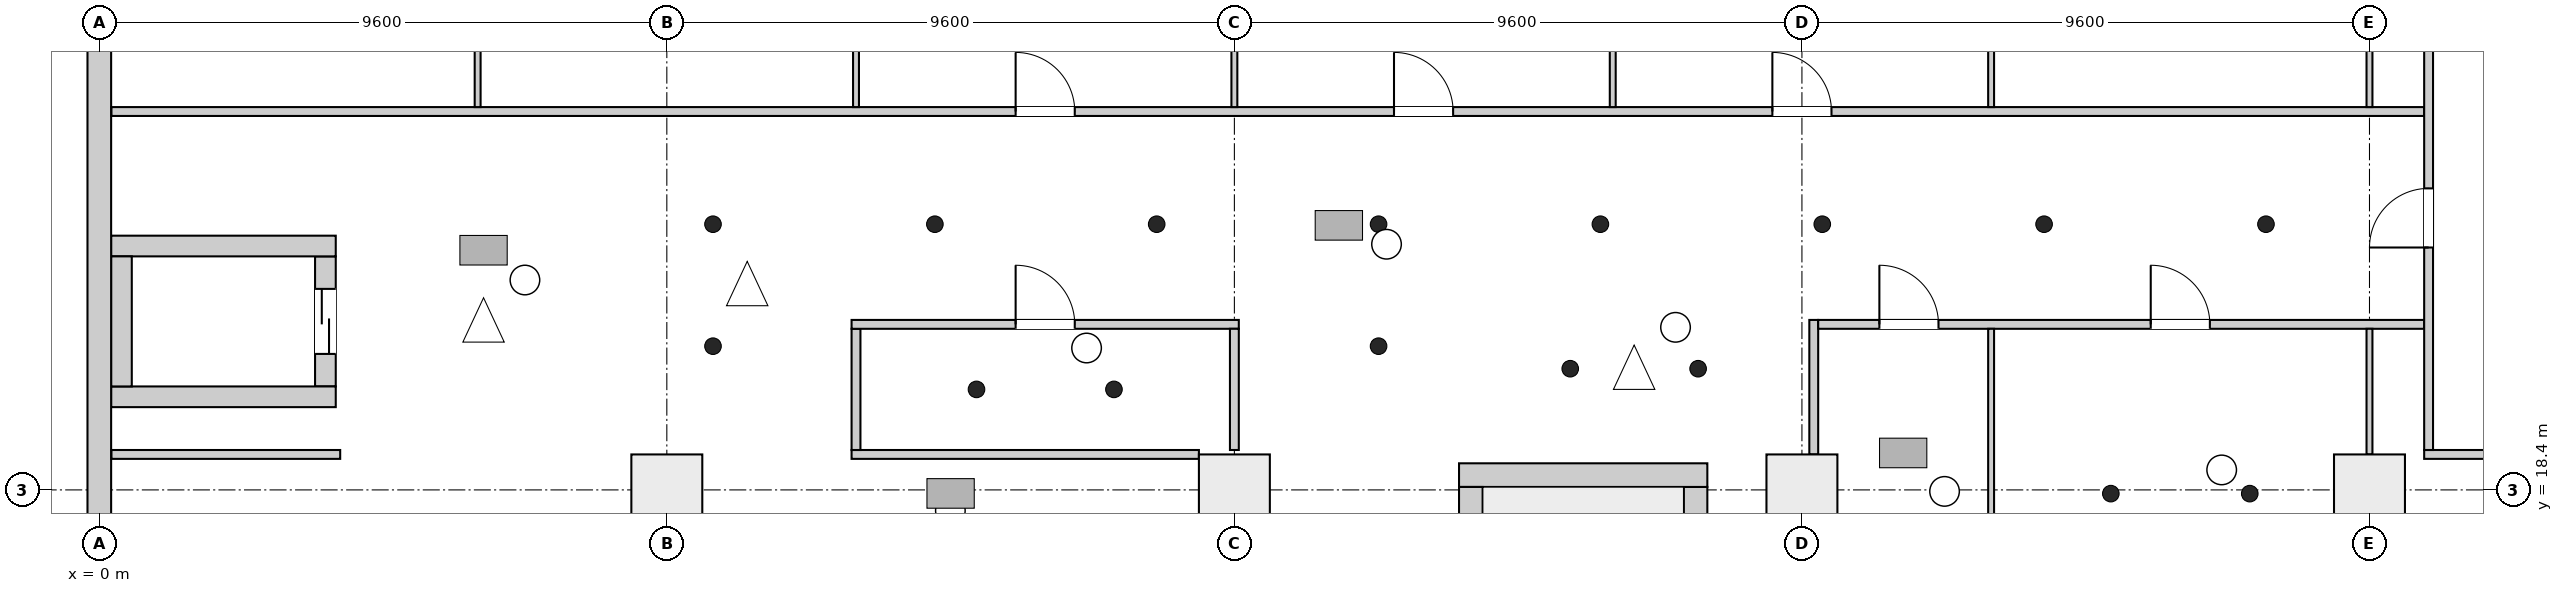
"""IFC4 building model, lengths in metres.
Left out: names, types, materials, properties, quantities, classifications, styles, units other than length and angle.
Written with IfcOpenShell. Run it as: python <this file> out.ifc"""

import sys

from ifc_helpers import new_model, si_unit, direction, frame, frame_2d, origin, origin_2d, place, context, subcontext, project, spatial, rectangle, extrude, element, fill, save


model = new_model("IFC4")
c1 = context("Model", 3, precision=1e-05, world=origin(), true_north=direction((0.0, 1.0)))
c2 = subcontext(c1, "Body", "Model", "MODEL_VIEW")
j1 = project(units=[si_unit("LENGTHUNIT", "METRE"), si_unit("PLANEANGLEUNIT", "RADIAN")], contexts=[c1])
p1 = place(None, origin())
s1 = spatial("IfcSite", under=j1, at=p1, CompositionType="ELEMENT")
p2 = place(p1, origin())
s2 = spatial("IfcBuilding", under=s1, at=p2, CompositionType="ELEMENT")
p3 = place(p2, frame((0.0, 0.0, 21.7)))
s3 = spatial("IfcBuildingStorey", under=s2, at=p3, CompositionType="ELEMENT", Elevation=21.7)
p4 = place(p3, frame((0.0, -0.2, 0.0), z_axis=(0.0, 0.0, 1.0), x_axis=(0.0, 1.0, 0.0)))
e1 = element("IfcWall", 1, at=p4, inside=s3, PredefinedType="SHEAR", context=c2, shape_type="SweptSolid", body=[
    extrude(rectangle(XDim=46.88, YDim=0.4, at=frame_2d((23.44, 0.0))), origin(), (0.0, 0.0, 1.0), 5.0),
])
p5 = place(p3, frame((23.0, 18.65, 0.0), z_axis=(0.0, 0.0, 1.0), x_axis=(1.0, 0.0, 0.0)))
e2 = element("IfcWall", 2, at=p5, inside=s3, PredefinedType="SHEAR", context=c2, shape_type="SweptSolid", body=[
    extrude(rectangle(XDim=4.2, YDim=0.4, at=frame_2d((2.1, 0.0))), origin(), (0.0, 0.0, 1.0), 5.0),
])
for number, where, z_axis, x_axis in (
    (3, (23.2, 11.85, 0.0), (0.0, 0.0, 1.0), (0.0, 1.0, 0.0)),
    (4, (27.0, 11.85, 0.0), (0.0, 0.0, 1.0), (0.0, 1.0, 0.0)),
):
    element("IfcWall", number, at=place(p3, frame(where, z_axis=z_axis, x_axis=x_axis)), inside=s3, PredefinedType="SHEAR", context=c2, shape_type="SweptSolid", body=[
        extrude(rectangle(XDim=6.6, YDim=0.4, at=frame_2d((3.3, 0.0))), origin(), (0.0, 0.0, 1.0), 5.0),
    ])
for number, where, z_axis, x_axis in (
    (5, (0.2, 19.975, 0.0), (0.0, 0.0, 1.0), (1.0, 0.0, 0.0)),
    (6, (0.2, 22.525, 0.0), (0.0, 0.0, 1.0), (1.0, 0.0, 0.0)),
):
    element("IfcWall", number, at=place(p3, frame(where, z_axis=z_axis, x_axis=x_axis)), inside=s3, PredefinedType="SHEAR", context=c2, shape_type="SweptSolid", body=[
        extrude(rectangle(XDim=3.8, YDim=0.35, at=frame_2d((1.9, 0.0))), origin(), (0.0, 0.0, 1.0), 5.0),
    ])
p6 = place(p3, frame((0.375, 20.15, 0.0), z_axis=(0.0, 0.0, 1.0), x_axis=(0.0, 1.0, 0.0)))
e7 = element("IfcWall", 7, at=p6, inside=s3, PredefinedType="SHEAR", context=c2, shape_type="SweptSolid", body=[
    extrude(rectangle(XDim=2.2, YDim=0.35, at=frame_2d((1.1, 0.0))), origin(), (0.0, 0.0, 1.0), 5.0),
])
p7 = place(p3, frame((3.825, 20.15, 0.0), z_axis=(0.0, 0.0, 1.0), x_axis=(0.0, 1.0, 0.0)))
e8 = element("IfcWall", 8, at=p7, inside=s3, PredefinedType="SHEAR", context=c2, shape_type="SweptSolid", body=[
    extrude(rectangle(XDim=2.2, YDim=0.35, at=frame_2d((1.1, 0.0))), origin(), (0.0, 0.0, 1.0), 5.0),
])
p8 = place(p7, frame((0.55, 0.0, 0.0)))
e9 = element("IfcOpeningElement", 9, at=p8, cuts=e8, PredefinedType="OPENING", context=c2, shape_type="SweptSolid", body=[
    extrude(rectangle(XDim=1.1, YDim=2.1, at=frame_2d((0.55, 1.05))), frame((0.0, 0.185, 0.0), z_axis=(0.0, -1.0, 0.0), x_axis=(1.0, 0.0, 0.0)), (0.0, 0.0, 1.0), 0.37),
])
for number, where, z_axis, x_axis in (
    (10, (9.6, 18.4, 0.0), (0.0, 0.0, 1.0), (1.0, 0.0, 0.0)),
    (11, (19.2, 18.4, 0.0), (0.0, 0.0, 1.0), (1.0, 0.0, 0.0)),
    (12, (28.8, 18.4, 0.0), (0.0, 0.0, 1.0), (1.0, 0.0, 0.0)),
    (13, (38.4, 18.4, 0.0), (0.0, 0.0, 1.0), (1.0, 0.0, 0.0)),
):
    element("IfcColumn", number, at=place(p3, frame(where, z_axis=z_axis, x_axis=x_axis)), inside=s3, PredefinedType="COLUMN", context=c2, shape_type="SweptSolid", body=[
        extrude(rectangle(XDim=1.2, YDim=1.2, at=origin_2d()), origin(), (0.0, 0.0, 1.0), 5.0),
    ])
p9 = place(p3, frame((0.206, 19.0, 0.0), z_axis=(0.0, 0.0, 1.0), x_axis=(1.0, 0.0, 0.0)))
e14 = element("IfcWall", 14, at=p9, inside=s3, PredefinedType="PARTITIONING", context=c2, shape_type="SweptSolid", body=[
    extrude(rectangle(XDim=3.869, YDim=0.15, at=frame_2d((1.935, 0.0))), origin(), (0.0, 0.0, 1.0), 4.65),
])
p10 = place(p3, frame((0.206, 24.8, 0.0), z_axis=(0.0, 0.0, 1.0), x_axis=(1.0, 0.0, 0.0)))
e15 = element("IfcWall", 15, at=p10, inside=s3, PredefinedType="PARTITIONING", context=c2, shape_type="SweptSolid", body=[
    extrude(rectangle(XDim=39.119, YDim=0.15, at=frame_2d((19.56, 0.0))), origin(), (0.0, 0.0, 1.0), 4.65),
])
p11 = place(p10, frame((15.294, 0.0, 0.0)))
e16 = element("IfcOpeningElement", 16, at=p11, cuts=e15, PredefinedType="OPENING", context=c2, shape_type="SweptSolid", body=[
    extrude(rectangle(XDim=1.0, YDim=2.1, at=frame_2d((0.5, 1.05))), frame((0.0, 0.085, 0.0), z_axis=(0.0, -1.0, 0.0), x_axis=(1.0, 0.0, 0.0)), (0.0, 0.0, 1.0), 0.17),
])
p12 = place(p10, frame((21.694, 0.0, 0.0)))
e17 = element("IfcOpeningElement", 17, at=p12, cuts=e15, PredefinedType="OPENING", context=c2, shape_type="SweptSolid", body=[
    extrude(rectangle(XDim=1.0, YDim=2.1, at=frame_2d((0.5, 1.05))), frame((0.0, 0.085, 0.0), z_axis=(0.0, -1.0, 0.0), x_axis=(1.0, 0.0, 0.0)), (0.0, 0.0, 1.0), 0.17),
])
p13 = place(p10, frame((28.094, 0.0, 0.0)))
e18 = element("IfcOpeningElement", 18, at=p13, cuts=e15, PredefinedType="OPENING", context=c2, shape_type="SweptSolid", body=[
    extrude(rectangle(XDim=1.0, YDim=2.1, at=frame_2d((0.5, 1.05))), frame((0.0, 0.085, 0.0), z_axis=(0.0, -1.0, 0.0), x_axis=(1.0, 0.0, 0.0)), (0.0, 0.0, 1.0), 0.17),
])
p14 = place(p3, frame((6.4, 24.875, 0.0), z_axis=(0.0, 0.0, 1.0), x_axis=(0.0, 1.0, 0.0)))
e19 = element("IfcWall", 19, at=p14, inside=s3, PredefinedType="PARTITIONING", context=c2, shape_type="SweptSolid", body=[
    extrude(rectangle(XDim=9.65, YDim=0.1, at=frame_2d((4.825, 0.0))), origin(), (0.0, 0.0, 1.0), 4.65),
])
p15 = place(p3, frame((12.725, 19.0, 0.0), z_axis=(0.0, 0.0, 1.0), x_axis=(1.0, 0.0, 0.0)))
e20 = element("IfcWall", 20, at=p15, inside=s3, PredefinedType="PARTITIONING", context=c2, shape_type="SweptSolid", body=[
    extrude(rectangle(XDim=5.875, YDim=0.15, at=frame_2d((2.938, 0.0))), origin(), (0.0, 0.0, 1.0), 4.65),
])
p16 = place(p3, frame((12.8, 19.075, 0.0), z_axis=(0.0, 0.0, 1.0), x_axis=(0.0, 1.0, 0.0)))
e21 = element("IfcWall", 21, at=p16, inside=s3, PredefinedType="PARTITIONING", context=c2, shape_type="SweptSolid", body=[
    extrude(rectangle(XDim=2.05, YDim=0.15, at=frame_2d((1.025, 0.0))), origin(), (0.0, 0.0, 1.0), 4.65),
])
p17 = place(p3, frame((12.725, 21.2, 0.0), z_axis=(0.0, 0.0, 1.0), x_axis=(1.0, 0.0, 0.0)))
e22 = element("IfcWall", 22, at=p17, inside=s3, PredefinedType="PARTITIONING", context=c2, shape_type="SweptSolid", body=[
    extrude(rectangle(XDim=6.55, YDim=0.15, at=frame_2d((3.275, 0.0))), origin(), (0.0, 0.0, 1.0), 4.65),
])
p18 = place(p17, frame((2.775, 0.0, 0.0)))
e23 = element("IfcOpeningElement", 23, at=p18, cuts=e22, PredefinedType="OPENING", context=c2, shape_type="SweptSolid", body=[
    extrude(rectangle(XDim=1.0, YDim=2.1, at=frame_2d((0.5, 1.05))), frame((0.0, 0.085, 0.0), z_axis=(0.0, -1.0, 0.0), x_axis=(1.0, 0.0, 0.0)), (0.0, 0.0, 1.0), 0.17),
])
p19 = place(p3, frame((12.8, 24.875, 0.0), z_axis=(0.0, 0.0, 1.0), x_axis=(0.0, 1.0, 0.0)))
e24 = element("IfcWall", 24, at=p19, inside=s3, PredefinedType="PARTITIONING", context=c2, shape_type="SweptSolid", body=[
    extrude(rectangle(XDim=2.25, YDim=0.1, at=frame_2d((1.125, 0.0))), origin(), (0.0, 0.0, 1.0), 4.65),
])
p20 = place(p3, frame((19.2, 19.075, 0.0), z_axis=(0.0, 0.0, 1.0), x_axis=(0.0, 1.0, 0.0)))
e25 = element("IfcWall", 25, at=p20, inside=s3, PredefinedType="PARTITIONING", context=c2, shape_type="SweptSolid", body=[
    extrude(rectangle(XDim=2.05, YDim=0.15, at=frame_2d((1.025, 0.0))), origin(), (0.0, 0.0, 1.0), 4.25),
])
p21 = place(p3, frame((19.2, 24.875, 0.0), z_axis=(0.0, 0.0, 1.0), x_axis=(0.0, 1.0, 0.0)))
e26 = element("IfcWall", 26, at=p21, inside=s3, PredefinedType="PARTITIONING", context=c2, shape_type="SweptSolid", body=[
    extrude(rectangle(XDim=2.125, YDim=0.1, at=frame_2d((1.062, 0.0))), origin(), (0.0, 0.0, 1.0), 4.25),
])
p22 = place(p3, frame((25.6, 24.875, 0.0), z_axis=(0.0, 0.0, 1.0), x_axis=(0.0, 1.0, 0.0)))
e27 = element("IfcWall", 27, at=p22, inside=s3, PredefinedType="PARTITIONING", context=c2, shape_type="SweptSolid", body=[
    extrude(rectangle(XDim=2.25, YDim=0.1, at=frame_2d((1.125, 0.0))), origin(), (0.0, 0.0, 1.0), 4.65),
])
p23 = place(p3, frame((29.0, 19.0, 0.0), z_axis=(0.0, 0.0, 1.0), x_axis=(0.0, 1.0, 0.0)))
e28 = element("IfcWall", 28, at=p23, inside=s3, PredefinedType="PARTITIONING", context=c2, shape_type="SweptSolid", body=[
    extrude(rectangle(XDim=2.275, YDim=0.15, at=frame_2d((1.137, 0.0))), origin(), (0.0, 0.0, 1.0), 4.25),
])
p24 = place(p3, frame((29.075, 21.2, 0.0), z_axis=(0.0, 0.0, 1.0), x_axis=(1.0, 0.0, 0.0)))
e29 = element("IfcWall", 29, at=p24, inside=s3, PredefinedType="PARTITIONING", context=c2, shape_type="SweptSolid", body=[
    extrude(rectangle(XDim=10.25, YDim=0.15, at=frame_2d((5.125, 0.0))), origin(), (0.0, 0.0, 1.0), 4.65),
])
p25 = place(p24, frame((1.035, 0.0, 0.0)))
e30 = element("IfcOpeningElement", 30, at=p25, cuts=e29, PredefinedType="OPENING", context=c2, shape_type="SweptSolid", body=[
    extrude(rectangle(XDim=1.0, YDim=2.1, at=frame_2d((0.5, 1.05))), frame((0.0, 0.085, 0.0), z_axis=(0.0, -1.0, 0.0), x_axis=(1.0, 0.0, 0.0)), (0.0, 0.0, 1.0), 0.17),
])
p26 = place(p24, frame((5.625, 0.0, 0.0)))
e31 = element("IfcOpeningElement", 31, at=p26, cuts=e29, PredefinedType="OPENING", context=c2, shape_type="SweptSolid", body=[
    extrude(rectangle(XDim=1.0, YDim=2.1, at=frame_2d((0.5, 1.05))), frame((0.0, 0.085, 0.0), z_axis=(0.0, -1.0, 0.0), x_axis=(1.0, 0.0, 0.0)), (0.0, 0.0, 1.0), 0.17),
])
p27 = place(p3, frame((32.0, 11.575, 0.0), z_axis=(0.0, 0.0, 1.0), x_axis=(0.0, 1.0, 0.0)))
e32 = element("IfcWall", 32, at=p27, inside=s3, PredefinedType="PARTITIONING", context=c2, shape_type="SweptSolid", body=[
    extrude(rectangle(XDim=9.55, YDim=0.1, at=frame_2d((4.775, 0.0))), origin(), (0.0, 0.0, 1.0), 4.65),
])
p28 = place(p3, frame((32.0, 24.875, 0.0), z_axis=(0.0, 0.0, 1.0), x_axis=(0.0, 1.0, 0.0)))
e33 = element("IfcWall", 33, at=p28, inside=s3, PredefinedType="PARTITIONING", context=c2, shape_type="SweptSolid", body=[
    extrude(rectangle(XDim=2.25, YDim=0.1, at=frame_2d((1.125, 0.0))), origin(), (0.0, 0.0, 1.0), 4.65),
])
for number, where, z_axis, x_axis in (
    (34, (38.4, 19.0, 0.0), (0.0, 0.0, 1.0), (0.0, 1.0, 0.0)),
    (35, (38.4, 24.875, 0.0), (0.0, 0.0, 1.0), (0.0, 1.0, 0.0)),
):
    element("IfcWall", number, at=place(p3, frame(where, z_axis=z_axis, x_axis=x_axis)), inside=s3, PredefinedType="PARTITIONING", context=c2, shape_type="SweptSolid", body=[
        extrude(rectangle(XDim=2.125, YDim=0.1, at=frame_2d((1.062, 0.0))), origin(), (0.0, 0.0, 1.0), 4.25),
    ])
p29 = place(p3, frame((39.325, 19.0, 0.0), z_axis=(0.0, 0.0, 1.0), x_axis=(1.0, 0.0, 0.0)))
e36 = element("IfcWall", 36, at=p29, inside=s3, PredefinedType="PARTITIONING", context=c2, shape_type="SweptSolid", body=[
    extrude(rectangle(XDim=8.075, YDim=0.15, at=frame_2d((4.038, 0.0))), origin(), (0.0, 0.0, 1.0), 4.65),
])
p30 = place(p3, frame((39.4, 19.075, 0.0), z_axis=(0.0, 0.0, 1.0), x_axis=(0.0, 1.0, 0.0)))
e37 = element("IfcWall", 37, at=p30, inside=s3, PredefinedType="PARTITIONING", context=c2, shape_type="SweptSolid", body=[
    extrude(rectangle(XDim=8.0, YDim=0.15, at=frame_2d((4.0, 0.0))), origin(), (0.0, 0.0, 1.0), 4.65),
])
p31 = place(p30, frame((3.425, 0.0, 0.0)))
e38 = element("IfcOpeningElement", 38, at=p31, cuts=e37, PredefinedType="OPENING", context=c2, shape_type="SweptSolid", body=[
    extrude(rectangle(XDim=1.0, YDim=2.1, at=frame_2d((0.5, 1.05))), frame((0.0, 0.085, 0.0), z_axis=(0.0, -1.0, 0.0), x_axis=(1.0, 0.0, 0.0)), (0.0, 0.0, 1.0), 0.17),
])
p32 = place(p8, origin())
e39 = element("IfcDoor", 39, at=p32, inside=s3, OperationType="DOUBLE_DOOR_SLIDING", PredefinedType="DOOR", context=c2, shape_type="SweptSolid", body=[
    extrude(rectangle(XDim=1.1, YDim=2.1, at=frame_2d((0.55, 1.05))), frame((0.0, 0.025, 0.0), z_axis=(0.0, -1.0, 0.0), x_axis=(1.0, 0.0, 0.0)), (0.0, 0.0, 1.0), 0.05),
])
fill(e9, e39)
p33 = place(p18, origin())
e40 = element("IfcDoor", 40, at=p33, inside=s3, OperationType="SINGLE_SWING_RIGHT", PredefinedType="DOOR", context=c2, shape_type="SweptSolid", body=[
    extrude(rectangle(XDim=1.0, YDim=2.1, at=frame_2d((0.5, 1.05))), frame((0.0, 0.025, 0.0), z_axis=(0.0, -1.0, 0.0), x_axis=(1.0, 0.0, 0.0)), (0.0, 0.0, 1.0), 0.05),
])
fill(e23, e40)
p34 = place(p25, origin())
e41 = element("IfcDoor", 41, at=p34, inside=s3, OperationType="SINGLE_SWING_RIGHT", PredefinedType="DOOR", context=c2, shape_type="SweptSolid", body=[
    extrude(rectangle(XDim=1.0, YDim=2.1, at=frame_2d((0.5, 1.05))), frame((0.0, 0.025, 0.0), z_axis=(0.0, -1.0, 0.0), x_axis=(1.0, 0.0, 0.0)), (0.0, 0.0, 1.0), 0.05),
])
fill(e30, e41)
p35 = place(p26, origin())
e42 = element("IfcDoor", 42, at=p35, inside=s3, OperationType="SINGLE_SWING_LEFT", PredefinedType="DOOR", context=c2, shape_type="SweptSolid", body=[
    extrude(rectangle(XDim=1.0, YDim=2.1, at=frame_2d((0.5, 1.05))), frame((0.0, 0.025, 0.0), z_axis=(0.0, -1.0, 0.0), x_axis=(1.0, 0.0, 0.0)), (0.0, 0.0, 1.0), 0.05),
])
fill(e31, e42)
p36 = place(p11, origin())
e43 = element("IfcDoor", 43, at=p36, inside=s3, OperationType="SINGLE_SWING_LEFT", PredefinedType="DOOR", context=c2, shape_type="SweptSolid", body=[
    extrude(rectangle(XDim=1.0, YDim=2.1, at=frame_2d((0.5, 1.05))), frame((0.0, 0.025, 0.0), z_axis=(0.0, -1.0, 0.0), x_axis=(1.0, 0.0, 0.0)), (0.0, 0.0, 1.0), 0.05),
])
fill(e16, e43)
p37 = place(p12, origin())
e44 = element("IfcDoor", 44, at=p37, inside=s3, OperationType="SINGLE_SWING_RIGHT", PredefinedType="DOOR", context=c2, shape_type="SweptSolid", body=[
    extrude(rectangle(XDim=1.0, YDim=2.1, at=frame_2d((0.5, 1.05))), frame((0.0, 0.025, 0.0), z_axis=(0.0, -1.0, 0.0), x_axis=(1.0, 0.0, 0.0)), (0.0, 0.0, 1.0), 0.05),
])
fill(e17, e44)
p38 = place(p13, origin())
e45 = element("IfcDoor", 45, at=p38, inside=s3, OperationType="SINGLE_SWING_RIGHT", PredefinedType="DOOR", context=c2, shape_type="SweptSolid", body=[
    extrude(rectangle(XDim=1.0, YDim=2.1, at=frame_2d((0.5, 1.05))), frame((0.0, 0.025, 0.0), z_axis=(0.0, -1.0, 0.0), x_axis=(1.0, 0.0, 0.0)), (0.0, 0.0, 1.0), 0.05),
])
fill(e18, e45)
p39 = place(p31, origin())
e46 = element("IfcDoor", 46, at=p39, inside=s3, OperationType="SINGLE_SWING_LEFT", PredefinedType="DOOR", context=c2, shape_type="SweptSolid", body=[
    extrude(rectangle(XDim=1.0, YDim=2.1, at=frame_2d((0.5, 1.05))), frame((0.0, 0.025, 0.0), z_axis=(0.0, -1.0, 0.0), x_axis=(1.0, 0.0, 0.0)), (0.0, 0.0, 1.0), 0.05),
])
fill(e38, e46)
save(model, sys.argv[1])
